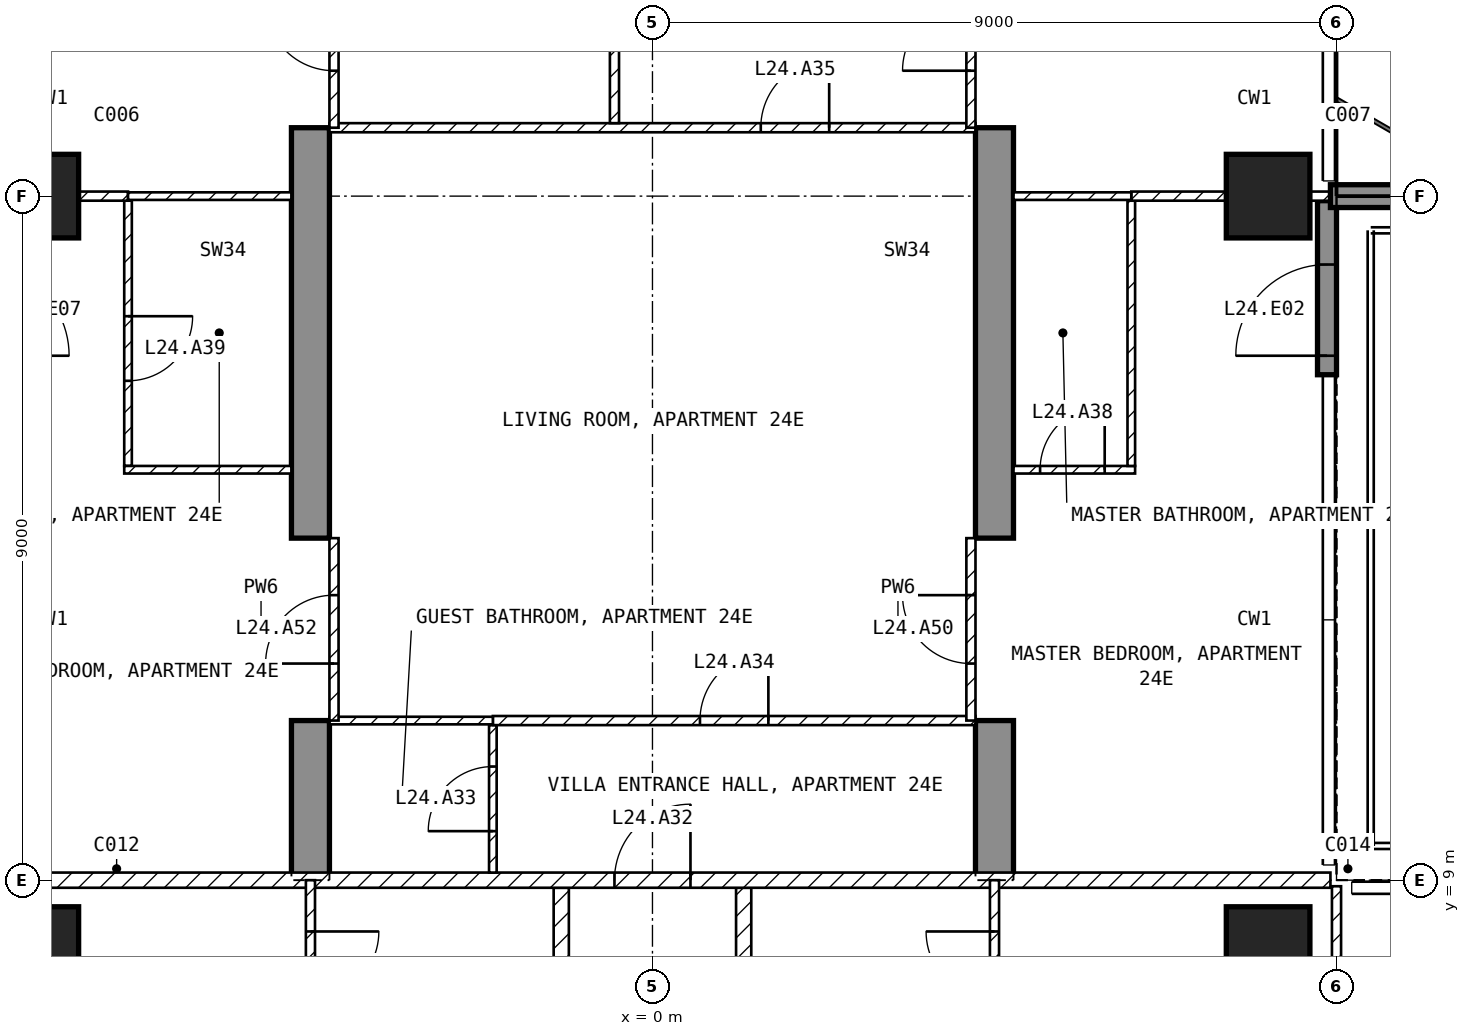
"""IFC4 building model, lengths in metres.
Left out: names, types, materials, properties, quantities, classifications, styles, units other than length and angle.
Written with IfcOpenShell. Run it as: python <this file> out.ifc"""

import sys

from ifc_helpers import new_model, si_unit, direction, frame, frame_2d, origin, origin_2d, place, context, subcontext, project, spatial, polyline, rectangle, outline, extrude, element, fill, save


model = new_model("IFC4")
c1 = context("Model", 3, precision=1e-05, world=origin(), true_north=direction((0.0, 1.0)))
c2 = subcontext(c1, "Body", "Model", "MODEL_VIEW")
j1 = project(units=[si_unit("LENGTHUNIT", "METRE"), si_unit("PLANEANGLEUNIT", "RADIAN")], contexts=[c1])
p1 = place(None, origin())
s1 = spatial("IfcSite", under=j1, at=p1, CompositionType="ELEMENT")
p2 = place(p1, origin())
s2 = spatial("IfcBuilding", under=s1, at=p2, CompositionType="ELEMENT")
p3 = place(p2, frame((0.0, 0.0, 105.9)))
s3 = spatial("IfcBuildingStorey", under=s2, at=p3, CompositionType="ELEMENT", Elevation=105.9)
for number, where, z_axis, x_axis in (
    (1, (-8.1, 8.1, -0.25), (0.0, 0.0, 1.0), (1.0, 0.0, 0.0)),
    (2, (-8.1, 18.0, -0.25), (0.0, 0.0, 1.0), (1.0, 0.0, 0.0)),
    (3, (8.1, 8.1, -0.25), (0.0, 0.0, 1.0), (1.0, 0.0, 0.0)),
    (4, (8.1, 18.0, -0.25), (0.0, 0.0, 1.0), (1.0, 0.0, 0.0)),
):
    element("IfcColumn", number, at=place(p3, frame(where, z_axis=z_axis, x_axis=x_axis)), inside=s3, PredefinedType="COLUMN", context=c2, shape_type="SweptSolid", body=[
        extrude(rectangle(XDim=1.1, YDim=1.1, at=origin_2d()), origin(), (0.0, 0.0, 1.0), 3.5),
    ])
for number, where, z_axis, x_axis in (
    (5, (-4.75, 9.0, -0.25), (1.0, 0.0, 0.0), (0.0, 1.0, 0.0)),
    (6, (4.25, 9.0, -0.25), (1.0, 0.0, 0.0), (0.0, 1.0, 0.0)),
):
    element("IfcWall", number, at=place(p3, frame(where, z_axis=z_axis, x_axis=x_axis)), inside=s3, PredefinedType="SHEAR", context=c2, shape_type="SweptSolid", body=[
        extrude(outline(polyline([(0.0, 0.0), (2.1, 0.0), (2.1, 2.65), (4.5, 2.65), (4.5, 0.0), (9.9, 0.0), (9.9, 2.65), (12.3, 2.65), (12.3, 0.0), (16.55, 0.0), (16.55, 3.5), (0.0, 3.5), (0.0, 0.0)])), origin(), (0.0, 0.0, 1.0), 0.5),
    ])
p4 = place(p3, frame((8.875, 15.65, 0.0), z_axis=(0.0, 0.0, 1.0), x_axis=(0.0, 1.0, 0.0)))
e7 = element("IfcWall", 7, at=p4, inside=s3, PredefinedType="SOLIDWALL", context=c2, shape_type="SweptSolid", body=[
    extrude(rectangle(XDim=2.29, YDim=0.25, at=frame_2d((1.145, 0.0))), origin(), (0.0, 0.0, 1.0), 3.25),
])
p5 = place(p4, frame((0.25, 0.0, 0.0)))
e8 = element("IfcOpeningElement", 8, at=p5, cuts=e7, PredefinedType="OPENING", context=c2, shape_type="SweptSolid", body=[
    extrude(rectangle(XDim=1.2, YDim=2.4, at=frame_2d((0.6, 1.2))), frame((0.0, 0.135, 0.0), z_axis=(0.0, -1.0, 0.0), x_axis=(1.0, 0.0, 0.0)), (0.0, 0.0, 1.0), 0.27),
])
p6 = place(p3, frame((8.92, 18.0, 0.0), z_axis=(0.0, 0.0, 1.0), x_axis=(1.0, 0.0, 0.0)))
e9 = element("IfcWall", 9, at=p6, inside=s3, PredefinedType="SOLIDWALL", context=c2, shape_type="SweptSolid", body=[
    extrude(rectangle(XDim=2.82, YDim=0.3, at=frame_2d((1.41, 0.0))), origin(), (0.0, 0.0, 1.0), 3.25),
])
for number, where, z_axis, x_axis in (
    (10, (1.2, 8.9, 0.0), (0.0, 0.0, 1.0), (0.0, -1.0, 0.0)),
    (11, (-1.2, 4.6, 0.0), (0.0, 0.0, 1.0), (0.0, 1.0, 0.0)),
):
    element("IfcWall", number, at=place(p3, frame(where, z_axis=z_axis, x_axis=x_axis)), inside=s3, PredefinedType="PARTITIONING", context=c2, shape_type="SweptSolid", body=[
        extrude(rectangle(XDim=4.3, YDim=0.2, at=frame_2d((2.15, 0.0))), origin(), (0.0, 0.0, 1.0), 3.25),
    ])
p7 = place(p3, frame((-8.92, 9.0, 0.0), z_axis=(0.0, 0.0, 1.0), x_axis=(1.0, 0.0, 0.0)))
e12 = element("IfcWall", 12, at=p7, inside=s3, PredefinedType="PARTITIONING", context=c2, shape_type="SweptSolid", body=[
    extrude(rectangle(XDim=17.84, YDim=0.2, at=frame_2d((8.92, 0.0))), origin(), (0.0, 0.0, 1.0), 3.25),
])
p8 = place(p7, frame((8.42, 0.0, 0.0)))
e13 = element("IfcOpeningElement", 13, at=p8, cuts=e12, PredefinedType="OPENING", context=c2, shape_type="SweptSolid", body=[
    extrude(rectangle(XDim=1.0, YDim=2.1, at=frame_2d((0.5, 1.05))), frame((0.0, 0.11, 0.0), z_axis=(0.0, -1.0, 0.0), x_axis=(1.0, 0.0, 0.0)), (0.0, 0.0, 1.0), 0.22),
])
p9 = place(p3, frame((9.0, 1.3, 0.0), z_axis=(0.0, 0.0, 1.0), x_axis=(0.0, 1.0, 0.0)))
e14 = element("IfcWall", 14, at=p9, inside=s3, PredefinedType="PARTITIONING", context=c2, shape_type="SweptSolid", body=[
    extrude(rectangle(XDim=7.62, YDim=0.12, at=frame_2d((3.81, 0.0))), origin(), (0.0, 0.0, 1.0), 3.25),
])
p10 = place(p9, frame((0.85, 0.0, 0.0)))
e15 = element("IfcOpeningElement", 15, at=p10, cuts=e14, PredefinedType="OPENING", context=c2, shape_type="SweptSolid", body=[
    extrude(rectangle(XDim=0.9, YDim=2.1, at=frame_2d((0.45, 1.05))), frame((0.0, 0.07, 0.0), z_axis=(0.0, -1.0, 0.0), x_axis=(1.0, 0.0, 0.0)), (0.0, 0.0, 1.0), 0.14),
])
p11 = place(p3, frame((4.5, 6.75, 0.0), z_axis=(0.0, 0.0, 1.0), x_axis=(0.0, 1.0, 0.0)))
e16 = element("IfcWall", 16, at=p11, inside=s3, PredefinedType="PARTITIONING", context=c2, shape_type="SweptSolid", body=[
    extrude(rectangle(XDim=2.25, YDim=0.12, at=frame_2d((1.125, 0.0))), origin(), (0.0, 0.0, 1.0), 3.25),
])
p12 = place(p11, frame((0.675, 0.0, 0.0)))
e17 = element("IfcOpeningElement", 17, at=p12, cuts=e16, PredefinedType="OPENING", context=c2, shape_type="SweptSolid", body=[
    extrude(rectangle(XDim=0.9, YDim=2.1, at=frame_2d((0.45, 1.05))), frame((0.0, 0.07, 0.0), z_axis=(0.0, -1.0, 0.0), x_axis=(1.0, 0.0, 0.0)), (0.0, 0.0, 1.0), 0.14),
])
p13 = place(p3, frame((-4.5, 9.0, 0.0), z_axis=(0.0, 0.0, 1.0), x_axis=(0.0, -1.0, 0.0)))
e18 = element("IfcWall", 18, at=p13, inside=s3, PredefinedType="PARTITIONING", context=c2, shape_type="SweptSolid", body=[
    extrude(rectangle(XDim=2.25, YDim=0.12, at=frame_2d((1.125, 0.0))), origin(), (0.0, 0.0, 1.0), 3.25),
])
p14 = place(p13, frame((0.675, 0.0, 0.0)))
e19 = element("IfcOpeningElement", 19, at=p14, cuts=e18, PredefinedType="OPENING", context=c2, shape_type="SweptSolid", body=[
    extrude(rectangle(XDim=0.9, YDim=2.1, at=frame_2d((0.45, 1.05))), frame((0.0, 0.07, 0.0), z_axis=(0.0, -1.0, 0.0), x_axis=(1.0, 0.0, 0.0)), (0.0, 0.0, 1.0), 0.14),
])
p15 = place(p3, frame((-2.1, 9.1, 0.0), z_axis=(0.0, 0.0, 1.0), x_axis=(0.0, 1.0, 0.0)))
e20 = element("IfcWall", 20, at=p15, inside=s3, PredefinedType="PARTITIONING", context=c2, shape_type="SweptSolid", body=[
    extrude(rectangle(XDim=1.94, YDim=0.1, at=frame_2d((0.97, 0.0))), origin(), (0.0, 0.0, 1.0), 3.25),
])
p16 = place(p15, frame((0.545, 0.0, 0.0)))
e21 = element("IfcOpeningElement", 21, at=p16, cuts=e20, PredefinedType="OPENING", context=c2, shape_type="SweptSolid", body=[
    extrude(rectangle(XDim=0.85, YDim=2.1, at=frame_2d((0.425, 1.05))), frame((0.0, 0.06, 0.0), z_axis=(0.0, -1.0, 0.0), x_axis=(1.0, 0.0, 0.0)), (0.0, 0.0, 1.0), 0.12),
])
p17 = place(p3, frame((-2.1, 11.1, 0.0), z_axis=(0.0, 0.0, 1.0), x_axis=(1.0, 0.0, 0.0)))
e22 = element("IfcWall", 22, at=p17, inside=s3, PredefinedType="PARTITIONING", context=c2, shape_type="SweptSolid", body=[
    extrude(rectangle(XDim=6.35, YDim=0.12, at=frame_2d((3.175, 0.0))), origin(), (0.0, 0.0, 1.0), 3.25),
])
p18 = place(p17, frame((2.725, 0.0, 0.0)))
e23 = element("IfcOpeningElement", 23, at=p18, cuts=e22, PredefinedType="OPENING", context=c2, shape_type="SweptSolid", body=[
    extrude(rectangle(XDim=0.9, YDim=2.1, at=frame_2d((0.45, 1.05))), frame((0.0, 0.07, 0.0), z_axis=(0.0, -1.0, 0.0), x_axis=(1.0, 0.0, 0.0)), (0.0, 0.0, 1.0), 0.14),
])
p19 = place(p3, frame((-4.25, 11.1, 0.0), z_axis=(0.0, 0.0, 1.0), x_axis=(1.0, 0.0, 0.0)))
e24 = element("IfcWall", 24, at=p19, inside=s3, PredefinedType="PARTITIONING", context=c2, shape_type="SweptSolid", body=[
    extrude(rectangle(XDim=2.15, YDim=0.1, at=frame_2d((1.075, 0.0))), origin(), (0.0, 0.0, 1.0), 3.25),
])
p20 = place(p3, frame((-4.25, 18.9, 0.0), z_axis=(0.0, 0.0, 1.0), x_axis=(1.0, 0.0, 0.0)))
e25 = element("IfcWall", 25, at=p20, inside=s3, PredefinedType="PARTITIONING", context=c2, shape_type="SweptSolid", body=[
    extrude(rectangle(XDim=8.5, YDim=0.12, at=frame_2d((4.25, 0.0))), origin(), (0.0, 0.0, 1.0), 3.25),
])
p21 = place(p20, frame((5.675, 0.0, 0.0)))
e26 = element("IfcOpeningElement", 26, at=p21, cuts=e25, PredefinedType="OPENING", context=c2, shape_type="SweptSolid", body=[
    extrude(rectangle(XDim=0.9, YDim=2.1, at=frame_2d((0.45, 1.05))), frame((0.0, 0.07, 0.0), z_axis=(0.0, -1.0, 0.0), x_axis=(1.0, 0.0, 0.0)), (0.0, 0.0, 1.0), 0.14),
])
p22 = place(p3, frame((-0.5, 18.96, 0.0), z_axis=(0.0, 0.0, 1.0), x_axis=(0.0, 1.0, 0.0)))
e27 = element("IfcWall", 27, at=p22, inside=s3, PredefinedType="PARTITIONING", context=c2, shape_type="SweptSolid", body=[
    extrude(rectangle(XDim=4.38, YDim=0.12, at=frame_2d((2.19, 0.0))), origin(), (0.0, 0.0, 1.0), 3.25),
])
p23 = place(p22, frame((1.74, 0.0, 0.0)))
e28 = element("IfcOpeningElement", 28, at=p23, cuts=e27, PredefinedType="OPENING", context=c2, shape_type="SweptSolid", body=[
    extrude(rectangle(XDim=0.9, YDim=2.1, at=frame_2d((0.45, 1.05))), frame((0.0, 0.07, 0.0), z_axis=(0.0, -1.0, 0.0), x_axis=(1.0, 0.0, 0.0)), (0.0, 0.0, 1.0), 0.14),
])
p24 = place(p3, frame((4.75, 14.4, 0.0), z_axis=(0.0, 0.0, 1.0), x_axis=(1.0, 0.0, 0.0)))
e29 = element("IfcWall", 29, at=p24, inside=s3, PredefinedType="PARTITIONING", context=c2, shape_type="SweptSolid", body=[
    extrude(rectangle(XDim=1.6, YDim=0.1, at=frame_2d((0.8, 0.0))), origin(), (0.0, 0.0, 1.0), 3.25),
])
p25 = place(p24, frame((0.35, 0.0, 0.0)))
e30 = element("IfcOpeningElement", 30, at=p25, cuts=e29, PredefinedType="OPENING", context=c2, shape_type="SweptSolid", body=[
    extrude(rectangle(XDim=0.85, YDim=2.1, at=frame_2d((0.425, 1.05))), frame((0.0, 0.06, 0.0), z_axis=(0.0, -1.0, 0.0), x_axis=(1.0, 0.0, 0.0)), (0.0, 0.0, 1.0), 0.12),
])
p26 = place(p3, frame((6.3, 14.45, 0.0), z_axis=(0.0, 0.0, 1.0), x_axis=(0.0, 1.0, 0.0)))
e31 = element("IfcWall", 31, at=p26, inside=s3, PredefinedType="PARTITIONING", context=c2, shape_type="SweptSolid", body=[
    extrude(rectangle(XDim=3.49, YDim=0.1, at=frame_2d((1.745, 0.0))), origin(), (0.0, 0.0, 1.0), 3.25),
])
p27 = place(p3, frame((6.3, 18.0, 0.0), z_axis=(0.0, 0.0, 1.0), x_axis=(1.0, 0.0, 0.0)))
e32 = element("IfcWall", 32, at=p27, inside=s3, PredefinedType="PARTITIONING", context=c2, shape_type="SweptSolid", body=[
    extrude(rectangle(XDim=2.62, YDim=0.12, at=frame_2d((1.31, 0.0))), origin(), (0.0, 0.0, 1.0), 2.414),
])
p28 = place(p3, frame((4.75, 18.0, 0.0), z_axis=(0.0, 0.0, 1.0), x_axis=(1.0, 0.0, 0.0)))
e33 = element("IfcWall", 33, at=p28, inside=s3, PredefinedType="PARTITIONING", context=c2, shape_type="SweptSolid", body=[
    extrude(rectangle(XDim=1.55, YDim=0.1, at=frame_2d((0.775, 0.0))), origin(), (0.0, 0.0, 1.0), 2.414),
])
p29 = place(p3, frame((-6.9, 17.94, 0.0), z_axis=(0.0, 0.0, 1.0), x_axis=(0.0, -1.0, 0.0)))
e34 = element("IfcWall", 34, at=p29, inside=s3, PredefinedType="PARTITIONING", context=c2, shape_type="SweptSolid", body=[
    extrude(rectangle(XDim=3.49, YDim=0.1, at=frame_2d((1.745, 0.0))), origin(), (0.0, 0.0, 1.0), 3.25),
])
p30 = place(p29, frame((1.52, 0.0, 0.0)))
e35 = element("IfcOpeningElement", 35, at=p30, cuts=e34, PredefinedType="OPENING", context=c2, shape_type="SweptSolid", body=[
    extrude(rectangle(XDim=0.85, YDim=2.1, at=frame_2d((0.425, 1.05))), frame((0.0, 0.06, 0.0), z_axis=(0.0, -1.0, 0.0), x_axis=(1.0, 0.0, 0.0)), (0.0, 0.0, 1.0), 0.12),
])
p31 = place(p3, frame((-6.95, 14.4, 0.0), z_axis=(0.0, 0.0, 1.0), x_axis=(1.0, 0.0, 0.0)))
e36 = element("IfcWall", 36, at=p31, inside=s3, PredefinedType="PARTITIONING", context=c2, shape_type="SweptSolid", body=[
    extrude(rectangle(XDim=2.2, YDim=0.1, at=frame_2d((1.1, 0.0))), origin(), (0.0, 0.0, 1.0), 3.25),
])
p32 = place(p3, frame((-8.92, 18.0, 0.0), z_axis=(0.0, 0.0, 1.0), x_axis=(1.0, 0.0, 0.0)))
e37 = element("IfcWall", 37, at=p32, inside=s3, PredefinedType="PARTITIONING", context=c2, shape_type="SweptSolid", body=[
    extrude(rectangle(XDim=2.02, YDim=0.12, at=frame_2d((1.01, 0.0))), origin(), (0.0, 0.0, 1.0), 2.414),
])
p33 = place(p3, frame((-6.9, 18.0, 0.0), z_axis=(0.0, 0.0, 1.0), x_axis=(1.0, 0.0, 0.0)))
e38 = element("IfcWall", 38, at=p33, inside=s3, PredefinedType="PARTITIONING", context=c2, shape_type="SweptSolid", body=[
    extrude(rectangle(XDim=2.15, YDim=0.1, at=frame_2d((1.075, 0.0))), origin(), (0.0, 0.0, 1.0), 2.414),
])
p34 = place(p3, frame((4.19, 11.1, 0.0), z_axis=(0.0, 0.0, 1.0), x_axis=(0.0, 1.0, 0.0)))
e39 = element("IfcWall", 39, at=p34, inside=s3, PredefinedType="PARTITIONING", context=c2, shape_type="SweptSolid", body=[
    extrude(rectangle(XDim=2.4, YDim=0.12, at=frame_2d((1.2, 0.0))), origin(), (0.0, 0.0, 1.0), 2.4),
])
p35 = place(p34, frame((0.75, 0.0, 0.0)))
e40 = element("IfcOpeningElement", 40, at=p35, cuts=e39, PredefinedType="OPENING", context=c2, shape_type="SweptSolid", body=[
    extrude(rectangle(XDim=0.9, YDim=2.1, at=frame_2d((0.45, 1.05))), frame((0.0, 0.07, 0.0), z_axis=(0.0, -1.0, 0.0), x_axis=(1.0, 0.0, 0.0)), (0.0, 0.0, 1.0), 0.14),
])
p36 = place(p3, frame((4.19, 18.9, 0.0), z_axis=(0.0, 0.0, 1.0), x_axis=(0.0, 1.0, 0.0)))
e41 = element("IfcWall", 41, at=p36, inside=s3, PredefinedType="PARTITIONING", context=c2, shape_type="SweptSolid", body=[
    extrude(rectangle(XDim=2.4, YDim=0.12, at=frame_2d((1.2, 0.0))), origin(), (0.0, 0.0, 1.0), 2.4),
])
p37 = place(p36, frame((0.75, 0.0, 0.0)))
e42 = element("IfcOpeningElement", 42, at=p37, cuts=e41, PredefinedType="OPENING", context=c2, shape_type="SweptSolid", body=[
    extrude(rectangle(XDim=0.9, YDim=2.1, at=frame_2d((0.45, 1.05))), frame((0.0, 0.07, 0.0), z_axis=(0.0, -1.0, 0.0), x_axis=(1.0, 0.0, 0.0)), (0.0, 0.0, 1.0), 0.14),
])
p38 = place(p3, frame((-4.19, 11.1, 0.0), z_axis=(0.0, 0.0, 1.0), x_axis=(0.0, 1.0, 0.0)))
e43 = element("IfcWall", 43, at=p38, inside=s3, PredefinedType="PARTITIONING", context=c2, shape_type="SweptSolid", body=[
    extrude(rectangle(XDim=2.4, YDim=0.12, at=frame_2d((1.2, 0.0))), origin(), (0.0, 0.0, 1.0), 2.4),
])
p39 = place(p38, frame((0.75, 0.0, 0.0)))
e44 = element("IfcOpeningElement", 44, at=p39, cuts=e43, PredefinedType="OPENING", context=c2, shape_type="SweptSolid", body=[
    extrude(rectangle(XDim=0.9, YDim=2.1, at=frame_2d((0.45, 1.05))), frame((0.0, 0.07, 0.0), z_axis=(0.0, -1.0, 0.0), x_axis=(1.0, 0.0, 0.0)), (0.0, 0.0, 1.0), 0.14),
])
p40 = place(p3, frame((-4.19, 18.9, 0.0), z_axis=(0.0, 0.0, 1.0), x_axis=(0.0, 1.0, 0.0)))
e45 = element("IfcWall", 45, at=p40, inside=s3, PredefinedType="PARTITIONING", context=c2, shape_type="SweptSolid", body=[
    extrude(rectangle(XDim=2.4, YDim=0.12, at=frame_2d((1.2, 0.0))), origin(), (0.0, 0.0, 1.0), 2.4),
])
p41 = place(p40, frame((0.75, 0.0, 0.0)))
e46 = element("IfcOpeningElement", 46, at=p41, cuts=e45, PredefinedType="OPENING", context=c2, shape_type="SweptSolid", body=[
    extrude(rectangle(XDim=0.9, YDim=2.1, at=frame_2d((0.45, 1.05))), frame((0.0, 0.07, 0.0), z_axis=(0.0, -1.0, 0.0), x_axis=(1.0, 0.0, 0.0)), (0.0, 0.0, 1.0), 0.14),
])
p42 = place(p5, origin())
e47 = element("IfcDoor", 47, at=p42, inside=s3, OperationType="SINGLE_SWING_LEFT", PredefinedType="DOOR", context=c2, shape_type="SweptSolid", body=[
    extrude(rectangle(XDim=1.2, YDim=2.4, at=frame_2d((0.6, 1.2))), frame((0.0, 0.025, 0.0), z_axis=(0.0, -1.0, 0.0), x_axis=(1.0, 0.0, 0.0)), (0.0, 0.0, 1.0), 0.05),
])
fill(e8, e47)
p43 = place(p12, origin())
e48 = element("IfcDoor", 48, at=p43, inside=s3, OperationType="SINGLE_SWING_RIGHT", PredefinedType="DOOR", context=c2, shape_type="SweptSolid", body=[
    extrude(rectangle(XDim=0.9, YDim=2.1, at=frame_2d((0.45, 1.05))), frame((0.0, 0.025, 0.0), z_axis=(0.0, -1.0, 0.0), x_axis=(1.0, 0.0, 0.0)), (0.0, 0.0, 1.0), 0.05),
])
fill(e17, e48)
p44 = place(p14, origin())
e49 = element("IfcDoor", 49, at=p44, inside=s3, OperationType="SINGLE_SWING_LEFT", PredefinedType="DOOR", context=c2, shape_type="SweptSolid", body=[
    extrude(rectangle(XDim=0.9, YDim=2.1, at=frame_2d((0.45, 1.05))), frame((0.0, 0.025, 0.0), z_axis=(0.0, -1.0, 0.0), x_axis=(1.0, 0.0, 0.0)), (0.0, 0.0, 1.0), 0.05),
])
fill(e19, e49)
p45 = place(p8, origin())
e50 = element("IfcDoor", 50, at=p45, inside=s3, OperationType="SINGLE_SWING_RIGHT", PredefinedType="DOOR", context=c2, shape_type="SweptSolid", body=[
    extrude(rectangle(XDim=1.0, YDim=2.1, at=frame_2d((0.5, 1.05))), frame((0.0, 0.025, 0.0), z_axis=(0.0, -1.0, 0.0), x_axis=(1.0, 0.0, 0.0)), (0.0, 0.0, 1.0), 0.05),
])
fill(e13, e50)
p46 = place(p16, origin())
e51 = element("IfcDoor", 51, at=p46, inside=s3, OperationType="SINGLE_SWING_LEFT", PredefinedType="DOOR", context=c2, shape_type="SweptSolid", body=[
    extrude(rectangle(XDim=0.85, YDim=2.1, at=frame_2d((0.425, 1.05))), frame((0.0, 0.025, 0.0), z_axis=(0.0, -1.0, 0.0), x_axis=(1.0, 0.0, 0.0)), (0.0, 0.0, 1.0), 0.05),
])
fill(e21, e51)
p47 = place(p18, origin())
e52 = element("IfcDoor", 52, at=p47, inside=s3, OperationType="SINGLE_SWING_RIGHT", PredefinedType="DOOR", context=c2, shape_type="SweptSolid", body=[
    extrude(rectangle(XDim=0.9, YDim=2.1, at=frame_2d((0.45, 1.05))), frame((0.0, 0.025, 0.0), z_axis=(0.0, -1.0, 0.0), x_axis=(1.0, 0.0, 0.0)), (0.0, 0.0, 1.0), 0.05),
])
fill(e23, e52)
p48 = place(p21, origin())
e53 = element("IfcDoor", 53, at=p48, inside=s3, OperationType="SINGLE_SWING_RIGHT", PredefinedType="DOOR", context=c2, shape_type="SweptSolid", body=[
    extrude(rectangle(XDim=0.9, YDim=2.1, at=frame_2d((0.45, 1.05))), frame((0.0, 0.025, 0.0), z_axis=(0.0, -1.0, 0.0), x_axis=(1.0, 0.0, 0.0)), (0.0, 0.0, 1.0), 0.05),
])
fill(e26, e53)
p49 = place(p25, origin())
e54 = element("IfcDoor", 54, at=p49, inside=s3, OperationType="SINGLE_SWING_RIGHT", PredefinedType="DOOR", context=c2, shape_type="SweptSolid", body=[
    extrude(rectangle(XDim=0.85, YDim=2.1, at=frame_2d((0.425, 1.05))), frame((0.0, 0.025, 0.0), z_axis=(0.0, -1.0, 0.0), x_axis=(1.0, 0.0, 0.0)), (0.0, 0.0, 1.0), 0.05),
])
fill(e30, e54)
p50 = place(p30, origin())
e55 = element("IfcDoor", 55, at=p50, inside=s3, OperationType="SINGLE_SWING_LEFT", PredefinedType="DOOR", context=c2, shape_type="SweptSolid", body=[
    extrude(rectangle(XDim=0.85, YDim=2.1, at=frame_2d((0.425, 1.05))), frame((0.0, 0.025, 0.0), z_axis=(0.0, -1.0, 0.0), x_axis=(1.0, 0.0, 0.0)), (0.0, 0.0, 1.0), 0.05),
])
fill(e35, e55)
p51 = place(p35, origin())
e56 = element("IfcDoor", 56, at=p51, inside=s3, OperationType="SINGLE_SWING_RIGHT", PredefinedType="DOOR", context=c2, shape_type="SweptSolid", body=[
    extrude(rectangle(XDim=0.9, YDim=2.1, at=frame_2d((0.45, 1.05))), frame((0.0, 0.025, 0.0), z_axis=(0.0, -1.0, 0.0), x_axis=(1.0, 0.0, 0.0)), (0.0, 0.0, 1.0), 0.05),
])
fill(e40, e56)
p52 = place(p37, origin())
e57 = element("IfcDoor", 57, at=p52, inside=s3, OperationType="SINGLE_SWING_LEFT", PredefinedType="DOOR", context=c2, shape_type="SweptSolid", body=[
    extrude(rectangle(XDim=0.9, YDim=2.1, at=frame_2d((0.45, 1.05))), frame((0.0, 0.025, 0.0), z_axis=(0.0, -1.0, 0.0), x_axis=(1.0, 0.0, 0.0)), (0.0, 0.0, 1.0), 0.05),
])
fill(e42, e57)
p53 = place(p39, origin())
e58 = element("IfcDoor", 58, at=p53, inside=s3, OperationType="SINGLE_SWING_LEFT", PredefinedType="DOOR", context=c2, shape_type="SweptSolid", body=[
    extrude(rectangle(XDim=0.9, YDim=2.1, at=frame_2d((0.45, 1.05))), frame((0.0, 0.025, 0.0), z_axis=(0.0, -1.0, 0.0), x_axis=(1.0, 0.0, 0.0)), (0.0, 0.0, 1.0), 0.05),
])
fill(e44, e58)
p54 = place(p41, origin())
e59 = element("IfcDoor", 59, at=p54, inside=s3, OperationType="SINGLE_SWING_RIGHT", PredefinedType="DOOR", context=c2, shape_type="SweptSolid", body=[
    extrude(rectangle(XDim=0.9, YDim=2.1, at=frame_2d((0.45, 1.05))), frame((0.0, 0.025, 0.0), z_axis=(0.0, -1.0, 0.0), x_axis=(1.0, 0.0, 0.0)), (0.0, 0.0, 1.0), 0.05),
])
fill(e46, e59)
save(model, sys.argv[1])
